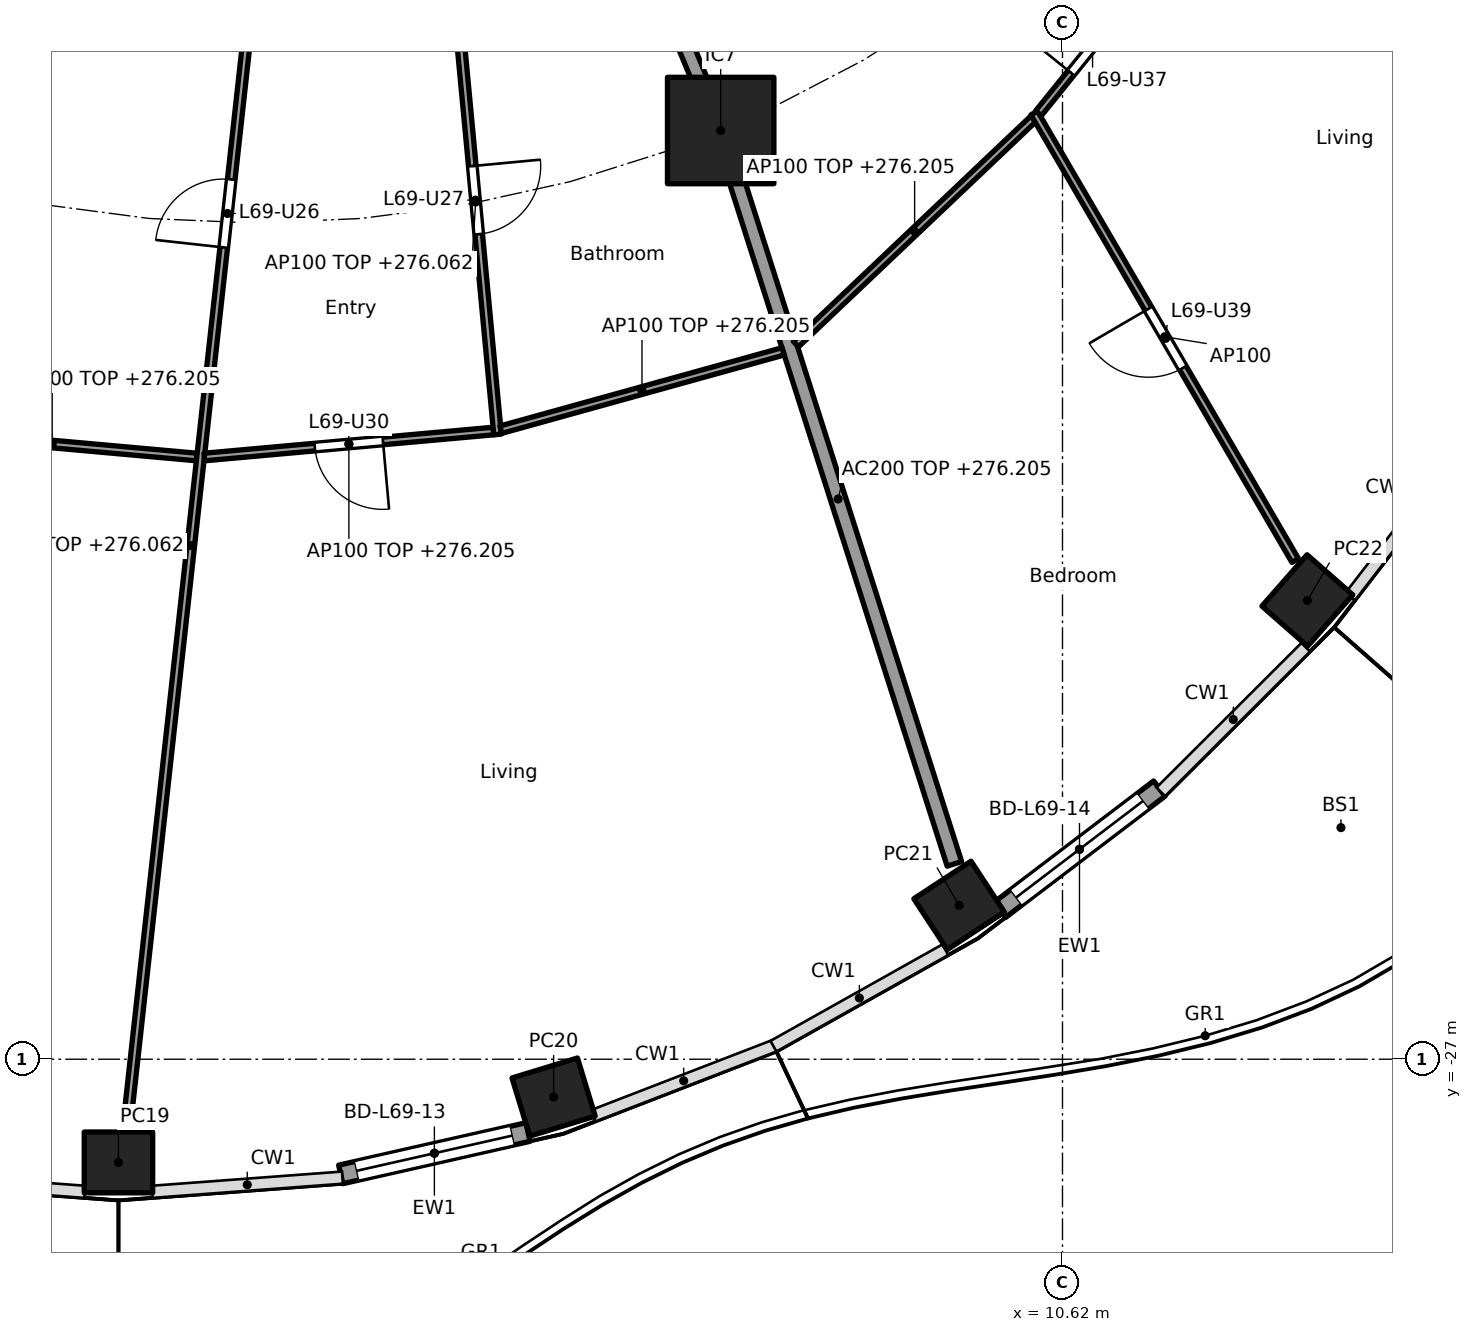
"""IFC4 building model, lengths in metres.
Left out: names, types, materials, properties, quantities, classifications, styles, units other than length and angle.
Written with IfcOpenShell. Run it as: python <this file> out.ifc"""

import sys

from ifc_helpers import new_model, si_unit, direction, frame, frame_2d, origin, origin_2d, place, context, subcontext, project, spatial, rectangle, hollow_rectangle, extrude, element, fill, save


model = new_model("IFC4")
c1 = context("Model", 3, precision=1e-05, world=origin(), true_north=direction((0.0, 1.0)))
c2 = subcontext(c1, "Body", "Model", "MODEL_VIEW")
j1 = project(units=[si_unit("LENGTHUNIT", "METRE"), si_unit("PLANEANGLEUNIT", "RADIAN")], contexts=[c1])
p1 = place(None, origin())
s1 = spatial("IfcSite", under=j1, at=p1, CompositionType="ELEMENT")
p2 = place(p1, origin())
s2 = spatial("IfcBuilding", under=s1, at=p2, CompositionType="ELEMENT")
p3 = place(p2, frame((0.0, 0.0, 273.3)))
s3 = spatial("IfcBuildingStorey", under=s2, at=p3, CompositionType="ELEMENT", Elevation=273.3)
for number, where, z_axis, x_axis in (
    (1, (-1.8, -28.358, 0.0), (0.0, 0.0, 1.0), (1.0, 0.0, 0.0)),
    (2, (3.925, -27.498, 0.0), (0.0, 0.0, 1.0), (0.957, 0.292, 0.0)),
    (3, (9.26, -24.976, 0.0), (0.0, 0.0, 1.0), (0.836, 0.549, 0.0)),
    (4, (13.841, -20.965, 0.0), (0.0, 0.0, 1.0), (0.66, 0.751, 0.0)),
):
    element("IfcColumn", number, at=place(p3, frame(where, z_axis=z_axis, x_axis=x_axis)), inside=s3, PredefinedType="COLUMN", context=c2, shape_type="SweptSolid", body=[
        extrude(hollow_rectangle(XDim=0.9, YDim=0.8, WallThickness=0.028, at=origin_2d()), origin(), (0.0, 0.0, 1.0), 3.7),
    ])
p4 = place(p3, frame((6.123, -14.782, 0.0), z_axis=(0.0, 0.0, 1.0), x_axis=(1.0, 0.0, 0.0)))
e5 = element("IfcColumn", 5, at=p4, inside=s3, PredefinedType="COLUMN", context=c2, shape_type="SweptSolid", body=[
    extrude(rectangle(XDim=1.4, YDim=1.4, at=origin_2d()), origin(), (0.0, 0.0, 1.0), 3.7),
])
p5 = place(p3, frame((3.588, -27.958, 0.0), z_axis=(0.0, 0.0, 1.0), x_axis=(-0.97531487046, -0.22081871175, 0.0)))
e6 = element("IfcWall", 6, at=p5, inside=s3, PredefinedType="SOLIDWALL", context=c2, shape_type="SweptSolid", body=[
    extrude(rectangle(XDim=2.525, YDim=0.25, at=frame_2d((1.263, 0.0))), origin(), (0.0, 0.0, 1.0), 3.44),
])
p6 = place(p5, frame((0.213, 0.0, 0.0)))
e7 = element("IfcOpeningElement", 7, at=p6, cuts=e6, PredefinedType="OPENING", context=c2, shape_type="SweptSolid", body=[
    extrude(rectangle(XDim=2.1, YDim=2.4, at=frame_2d((1.05, 1.2))), frame((0.0, 0.135, 0.0), z_axis=(0.0, -1.0, 0.0), x_axis=(1.0, 0.0, 0.0)), (0.0, 0.0, 1.0), 0.27),
])
p7 = place(p3, frame((11.895, -23.439, 0.0), z_axis=(0.0, 0.0, 1.0), x_axis=(-0.796055284084, -0.605223912847, 0.0)))
e8 = element("IfcWall", 8, at=p7, inside=s3, PredefinedType="SOLIDWALL", context=c2, shape_type="SweptSolid", body=[
    extrude(rectangle(XDim=2.641, YDim=0.25, at=frame_2d((1.32, 0.0))), origin(), (0.0, 0.0, 1.0), 3.44),
])
p8 = place(p7, frame((0.27, 0.0, 0.0)))
e9 = element("IfcOpeningElement", 9, at=p8, cuts=e8, PredefinedType="OPENING", context=c2, shape_type="SweptSolid", body=[
    extrude(rectangle(XDim=2.1, YDim=2.4, at=frame_2d((1.05, 1.2))), frame((0.0, 0.135, 0.0), z_axis=(0.0, -1.0, 0.0), x_axis=(1.0, 0.0, 0.0)), (0.0, 0.0, 1.0), 0.27),
])
p9 = place(p3, frame((5.243, -12.657, 0.0), z_axis=(0.0, 0.0, 1.0), x_axis=(0.382707856524, -0.923869415315, 0.0)))
e10 = element("IfcWall", 10, at=p9, inside=s3, PredefinedType="PARTITIONING", context=c2, shape_type="SweptSolid", body=[
    extrude(rectangle(XDim=2.2, YDim=0.2, at=frame_2d((1.1, 0.0))), origin(), (0.0, 0.0, 1.0), 3.44),
])
p10 = place(p3, frame((6.138, -14.83, 0.0), z_axis=(0.0, 0.0, 1.0), x_axis=(0.303653679037, -0.952782474234, 0.0)))
e11 = element("IfcWall", 11, at=p10, inside=s3, PredefinedType="PARTITIONING", context=c2, shape_type="SweptSolid", body=[
    extrude(rectangle(XDim=10.076, YDim=0.2, at=frame_2d((5.038, 0.0))), origin(), (0.0, 0.0, 1.0), 2.905),
])
p11 = place(p3, frame((-4.573, -18.736, 0.0), z_axis=(0.0, 0.0, 1.0), x_axis=(0.995986472869, -0.089503887414, 0.0)))
e12 = element("IfcWall", 12, at=p11, inside=s3, PredefinedType="PARTITIONING", context=c2, shape_type="SweptSolid", body=[
    extrude(rectangle(XDim=3.819, YDim=0.1, at=frame_2d((1.909, 0.0))), origin(), (0.0, 0.0, 1.0), 2.905),
])
p12 = place(p3, frame((-0.011, -12.664, 0.0), z_axis=(0.0, 0.0, 1.0), x_axis=(-0.109805889692, -0.993953050495, 0.0)))
e13 = element("IfcWall", 13, at=p12, inside=s3, PredefinedType="PARTITIONING", context=c2, shape_type="SweptSolid", body=[
    extrude(rectangle(XDim=15.248, YDim=0.1, at=frame_2d((7.624, 0.0))), origin(), (0.0, 0.0, 1.0), 2.762),
])
p13 = place(p12, frame((2.778, 0.0, 0.0)))
e14 = element("IfcOpeningElement", 14, at=p13, cuts=e13, PredefinedType="OPENING", context=c2, shape_type="SweptSolid", body=[
    extrude(rectangle(XDim=0.9, YDim=2.1, at=frame_2d((0.45, 1.05))), frame((0.0, 0.06, 0.0), z_axis=(0.0, -1.0, 0.0), x_axis=(1.0, 0.0, 0.0)), (0.0, 0.0, 1.0), 0.12),
])
p14 = place(p3, frame((-0.67, -19.077, 0.0), z_axis=(0.0, 0.0, 1.0), x_axis=(0.995986472869, 0.089503887414, 0.0)))
e15 = element("IfcWall", 15, at=p14, inside=s3, PredefinedType="PARTITIONING", context=c2, shape_type="SweptSolid", body=[
    extrude(rectangle(XDim=3.819, YDim=0.1, at=frame_2d((1.909, 0.0))), origin(), (0.0, 0.0, 1.0), 2.905),
])
p15 = place(p14, frame((1.459, 0.0, 0.0)))
e16 = element("IfcOpeningElement", 16, at=p15, cuts=e15, PredefinedType="OPENING", context=c2, shape_type="SweptSolid", body=[
    extrude(rectangle(XDim=0.9, YDim=2.1, at=frame_2d((0.45, 1.05))), frame((0.0, 0.06, 0.0), z_axis=(0.0, -1.0, 0.0), x_axis=(1.0, 0.0, 0.0)), (0.0, 0.0, 1.0), 0.12),
])
p16 = place(p3, frame((2.612, -12.664, 0.0), z_axis=(0.0, 0.0, 1.0), x_axis=(0.093781393779, -0.995592813444, 0.0)))
e17 = element("IfcWall", 17, at=p16, inside=s3, PredefinedType="PARTITIONING", context=c2, shape_type="SweptSolid", body=[
    extrude(rectangle(XDim=6.144, YDim=0.1, at=frame_2d((3.072, 0.0))), origin(), (0.0, 0.0, 1.0), 2.762),
])
p17 = place(p16, frame((2.597, 0.0, 0.0)))
e18 = element("IfcOpeningElement", 18, at=p17, cuts=e17, PredefinedType="OPENING", context=c2, shape_type="SweptSolid", body=[
    extrude(rectangle(XDim=0.9, YDim=2.1, at=frame_2d((0.45, 1.05))), frame((0.0, 0.06, 0.0), z_axis=(0.0, -1.0, 0.0), x_axis=(1.0, 0.0, 0.0)), (0.0, 0.0, 1.0), 0.12),
])
p18 = place(p3, frame((3.231, -18.718, 0.0), z_axis=(0.0, 0.0, 1.0), x_axis=(0.963606817151, 0.267323590318, 0.0)))
e19 = element("IfcWall", 19, at=p18, inside=s3, PredefinedType="PARTITIONING", context=c2, shape_type="SweptSolid", body=[
    extrude(rectangle(XDim=3.853, YDim=0.1, at=frame_2d((1.927, 0.0))), origin(), (0.0, 0.0, 1.0), 2.905),
])
p19 = place(p3, frame((7.113, -17.592, 0.0), z_axis=(0.0, 0.0, 1.0), x_axis=(0.725433932329, 0.688291805723, 0.0)))
e20 = element("IfcWall", 20, at=p19, inside=s3, PredefinedType="PARTITIONING", context=c2, shape_type="SweptSolid", body=[
    extrude(rectangle(XDim=4.305, YDim=0.1, at=frame_2d((2.153, 0.0))), origin(), (0.0, 0.0, 1.0), 2.905),
])
p20 = place(p3, frame((10.248, -14.551, 0.0), z_axis=(0.0, 0.0, 1.0), x_axis=(0.503826483408, -0.86380488226, 0.0)))
e21 = element("IfcWall", 21, at=p20, inside=s3, PredefinedType="PARTITIONING", context=c2, shape_type="SweptSolid", body=[
    extrude(rectangle(XDim=6.816, YDim=0.1, at=frame_2d((3.408, 0.0))), origin(), (0.0, 0.0, 1.0), 3.44),
])
p21 = place(p20, frame((2.983, 0.0, 0.0)))
e22 = element("IfcOpeningElement", 22, at=p21, cuts=e21, PredefinedType="OPENING", context=c2, shape_type="SweptSolid", body=[
    extrude(rectangle(XDim=0.9, YDim=2.1, at=frame_2d((0.45, 1.05))), frame((0.0, 0.06, 0.0), z_axis=(0.0, -1.0, 0.0), x_axis=(1.0, 0.0, 0.0)), (0.0, 0.0, 1.0), 0.12),
])
p22 = place(p3, frame((10.304, -14.555, 0.0), z_axis=(0.0, 0.0, 1.0), x_axis=(0.628170338674, 0.778075848237, 0.0)))
e23 = element("IfcWall", 23, at=p22, inside=s3, PredefinedType="PARTITIONING", context=c2, shape_type="SweptSolid", body=[
    extrude(rectangle(XDim=4.532, YDim=0.1, at=frame_2d((2.266, 0.0))), origin(), (0.0, 0.0, 1.0), 2.905),
])
p23 = place(p22, frame((0.683, 0.0, 0.0)))
e24 = element("IfcOpeningElement", 24, at=p23, cuts=e23, PredefinedType="OPENING", context=c2, shape_type="SweptSolid", body=[
    extrude(rectangle(XDim=0.9, YDim=2.1, at=frame_2d((0.45, 1.05))), frame((0.0, 0.06, 0.0), z_axis=(0.0, -1.0, 0.0), x_axis=(1.0, 0.0, 0.0)), (0.0, 0.0, 1.0), 0.12),
])
p24 = place(p6, origin())
e25 = element("IfcDoor", 25, at=p24, inside=s3, OperationType="SLIDING_TO_LEFT", PredefinedType="DOOR", context=c2, shape_type="SweptSolid", body=[
    extrude(rectangle(XDim=2.1, YDim=2.4, at=frame_2d((1.05, 1.2))), frame((0.0, 0.025, 0.0), z_axis=(0.0, -1.0, 0.0), x_axis=(1.0, 0.0, 0.0)), (0.0, 0.0, 1.0), 0.05),
])
fill(e7, e25)
p25 = place(p8, origin())
e26 = element("IfcDoor", 26, at=p25, inside=s3, OperationType="SLIDING_TO_LEFT", PredefinedType="DOOR", context=c2, shape_type="SweptSolid", body=[
    extrude(rectangle(XDim=2.1, YDim=2.4, at=frame_2d((1.05, 1.2))), frame((0.0, 0.025, 0.0), z_axis=(0.0, -1.0, 0.0), x_axis=(1.0, 0.0, 0.0)), (0.0, 0.0, 1.0), 0.05),
])
fill(e9, e26)
p26 = place(p13, frame((0.9, 0.0, 0.0), x_axis=(-1.0, 0.0, 0.0)))
e27 = element("IfcDoor", 27, at=p26, inside=s3, OperationType="SINGLE_SWING_LEFT", PredefinedType="DOOR", context=c2, shape_type="SweptSolid", body=[
    extrude(rectangle(XDim=0.9, YDim=2.1, at=frame_2d((0.45, 1.05))), frame((0.0, 0.025, 0.0), z_axis=(0.0, -1.0, 0.0), x_axis=(1.0, 0.0, 0.0)), (0.0, 0.0, 1.0), 0.05),
])
fill(e14, e27)
p27 = place(p17, origin())
e28 = element("IfcDoor", 28, at=p27, inside=s3, OperationType="SINGLE_SWING_LEFT", PredefinedType="DOOR", context=c2, shape_type="SweptSolid", body=[
    extrude(rectangle(XDim=0.9, YDim=2.1, at=frame_2d((0.45, 1.05))), frame((0.0, 0.025, 0.0), z_axis=(0.0, -1.0, 0.0), x_axis=(1.0, 0.0, 0.0)), (0.0, 0.0, 1.0), 0.05),
])
fill(e18, e28)
p28 = place(p15, frame((0.9, 0.0, 0.0), x_axis=(-1.0, 0.0, 0.0)))
e29 = element("IfcDoor", 29, at=p28, inside=s3, OperationType="SINGLE_SWING_LEFT", PredefinedType="DOOR", context=c2, shape_type="SweptSolid", body=[
    extrude(rectangle(XDim=0.9, YDim=2.1, at=frame_2d((0.45, 1.05))), frame((0.0, 0.025, 0.0), z_axis=(0.0, -1.0, 0.0), x_axis=(1.0, 0.0, 0.0)), (0.0, 0.0, 1.0), 0.05),
])
fill(e16, e29)
p29 = place(p23, origin())
e30 = element("IfcDoor", 30, at=p29, inside=s3, OperationType="SINGLE_SWING_LEFT", PredefinedType="DOOR", context=c2, shape_type="SweptSolid", body=[
    extrude(rectangle(XDim=0.9, YDim=2.1, at=frame_2d((0.45, 1.05))), frame((0.0, 0.025, 0.0), z_axis=(0.0, -1.0, 0.0), x_axis=(1.0, 0.0, 0.0)), (0.0, 0.0, 1.0), 0.05),
])
fill(e24, e30)
p30 = place(p21, frame((0.9, 0.0, 0.0), x_axis=(-1.0, 0.0, 0.0)))
e31 = element("IfcDoor", 31, at=p30, inside=s3, OperationType="SINGLE_SWING_RIGHT", PredefinedType="DOOR", context=c2, shape_type="SweptSolid", body=[
    extrude(rectangle(XDim=0.9, YDim=2.1, at=frame_2d((0.45, 1.05))), frame((0.0, 0.025, 0.0), z_axis=(0.0, -1.0, 0.0), x_axis=(1.0, 0.0, 0.0)), (0.0, 0.0, 1.0), 0.05),
])
fill(e22, e31)
save(model, sys.argv[1])
